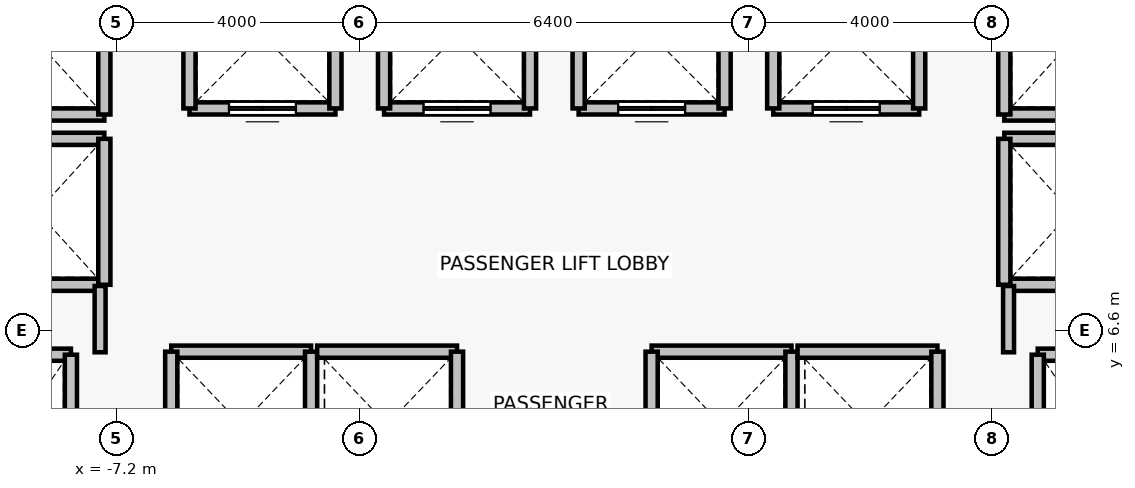
"""IFC4 building model, lengths in metres.
Left out: names, types, materials, properties, quantities, classifications, styles, units other than length and angle.
Written with IfcOpenShell. Run it as: python <this file> out.ifc"""

import sys

from ifc_helpers import new_model, si_unit, direction, frame, frame_2d, origin, place, context, subcontext, project, spatial, rectangle, extrude, source, transform, mapped, element, fill, save


model = new_model("IFC4")
c1 = context("Model", 3, precision=1e-05, world=origin(), true_north=direction((0.0, 1.0)))
c2 = subcontext(c1, "Body", "Model", "MODEL_VIEW")
j1 = project(units=[si_unit("LENGTHUNIT", "METRE"), si_unit("PLANEANGLEUNIT", "RADIAN")], contexts=[c1])
p1 = place(None, origin())
s1 = spatial("IfcSite", under=j1, at=p1, CompositionType="ELEMENT")
p2 = place(p1, origin())
s2 = spatial("IfcBuilding", under=s1, at=p2, CompositionType="ELEMENT")
p3 = place(p2, frame((0.0, 0.0, 57.1)))
s3 = spatial("IfcBuildingStorey", under=s2, at=p3, CompositionType="ELEMENT", Elevation=57.1)
p4 = place(p3, frame((-9.95, 6.2, 0.0), z_axis=(0.0, 0.0, 1.0), x_axis=(1.0, 0.0, 0.0)))
e1 = element("IfcWall", 1, at=p4, inside=s3, PredefinedType="SOLIDWALL", context=c2, shape_type="SweptSolid", body=[
    extrude(rectangle(XDim=2.0, YDim=0.2, at=frame_2d((1.0, 0.0))), origin(), (0.0, 0.0, 1.0), 3.075),
])
p5 = place(p3, frame((-7.95, 6.2, 0.0), z_axis=(0.0, 0.0, 1.0), x_axis=(0.0, -1.0, 0.0)))
e2 = element("IfcWall", 2, at=p5, inside=s3, PredefinedType="SOLIDWALL", context=c2, shape_type="SweptSolid", body=[
    extrude(rectangle(XDim=2.8, YDim=0.2, at=frame_2d((1.4, 0.0))), origin(), (0.0, 0.0, 1.0), 3.075),
])
p6 = place(p3, frame((7.95, 6.2, 0.0), z_axis=(0.0, 0.0, 1.0), x_axis=(1.0, 0.0, 0.0)))
e3 = element("IfcWall", 3, at=p6, inside=s3, PredefinedType="SOLIDWALL", context=c2, shape_type="SweptSolid", body=[
    extrude(rectangle(XDim=2.0, YDim=0.2, at=frame_2d((1.0, 0.0))), origin(), (0.0, 0.0, 1.0), 3.075),
])
p7 = place(p3, frame((7.95, 3.4, 0.0), z_axis=(0.0, 0.0, 1.0), x_axis=(0.0, 1.0, 0.0)))
e4 = element("IfcWall", 4, at=p7, inside=s3, PredefinedType="SOLIDWALL", context=c2, shape_type="SweptSolid", body=[
    extrude(rectangle(XDim=2.8, YDim=0.2, at=frame_2d((1.4, 0.0))), origin(), (0.0, 0.0, 1.0), 3.075),
])
p8 = place(p3, frame((-3.6, 10.25, 0.0), z_axis=(0.0, 0.0, 1.0), x_axis=(-1.0, 0.0, 0.0)))
e5 = element("IfcWall", 5, at=p8, inside=s3, PredefinedType="SOLIDWALL", context=c2, shape_type="SweptSolid", body=[
    extrude(rectangle(XDim=2.4, YDim=0.2, at=frame_2d((1.2, 0.0))), origin(), (0.0, 0.0, 1.0), 3.075),
])
p9 = place(p8, frame((0.65, 0.0, 0.0)))
e6 = element("IfcOpeningElement", 6, at=p9, cuts=e5, PredefinedType="OPENING", context=c2, shape_type="SweptSolid", body=[
    extrude(rectangle(XDim=1.1, YDim=2.2, at=frame_2d((0.55, 1.1))), frame((0.0, 0.11, 0.0), z_axis=(0.0, -1.0, 0.0), x_axis=(1.0, 0.0, 0.0)), (0.0, 0.0, 1.0), 0.22),
])
for number, where, z_axis, x_axis in (
    (7, (-6.0, 10.25, 0.0), (0.0, 0.0, 1.0), (0.0, 1.0, 0.0)),
    (8, (-3.6, 12.65, 0.0), (0.0, 0.0, 1.0), (0.0, -1.0, 0.0)),
):
    element("IfcWall", number, at=place(p3, frame(where, z_axis=z_axis, x_axis=x_axis)), inside=s3, PredefinedType="SOLIDWALL", context=c2, shape_type="SweptSolid", body=[
        extrude(rectangle(XDim=2.4, YDim=0.2, at=frame_2d((1.2, 0.0))), origin(), (0.0, 0.0, 1.0), 3.075),
    ])
p10 = place(p3, frame((-0.4, 10.25, 0.0), z_axis=(0.0, 0.0, 1.0), x_axis=(-1.0, 0.0, 0.0)))
e9 = element("IfcWall", 9, at=p10, inside=s3, PredefinedType="SOLIDWALL", context=c2, shape_type="SweptSolid", body=[
    extrude(rectangle(XDim=2.4, YDim=0.2, at=frame_2d((1.2, 0.0))), origin(), (0.0, 0.0, 1.0), 3.075),
])
p11 = place(p10, frame((0.65, 0.0, 0.0)))
e10 = element("IfcOpeningElement", 10, at=p11, cuts=e9, PredefinedType="OPENING", context=c2, shape_type="SweptSolid", body=[
    extrude(rectangle(XDim=1.1, YDim=2.2, at=frame_2d((0.55, 1.1))), frame((0.0, 0.11, 0.0), z_axis=(0.0, -1.0, 0.0), x_axis=(1.0, 0.0, 0.0)), (0.0, 0.0, 1.0), 0.22),
])
for number, where, z_axis, x_axis in (
    (11, (-2.8, 10.25, 0.0), (0.0, 0.0, 1.0), (0.0, 1.0, 0.0)),
    (12, (-0.4, 12.65, 0.0), (0.0, 0.0, 1.0), (0.0, -1.0, 0.0)),
):
    element("IfcWall", number, at=place(p3, frame(where, z_axis=z_axis, x_axis=x_axis)), inside=s3, PredefinedType="SOLIDWALL", context=c2, shape_type="SweptSolid", body=[
        extrude(rectangle(XDim=2.4, YDim=0.2, at=frame_2d((1.2, 0.0))), origin(), (0.0, 0.0, 1.0), 3.075),
    ])
p12 = place(p3, frame((2.8, 10.25, 0.0), z_axis=(0.0, 0.0, 1.0), x_axis=(-1.0, 0.0, 0.0)))
e13 = element("IfcWall", 13, at=p12, inside=s3, PredefinedType="SOLIDWALL", context=c2, shape_type="SweptSolid", body=[
    extrude(rectangle(XDim=2.4, YDim=0.2, at=frame_2d((1.2, 0.0))), origin(), (0.0, 0.0, 1.0), 3.075),
])
p13 = place(p12, frame((0.65, 0.0, 0.0)))
e14 = element("IfcOpeningElement", 14, at=p13, cuts=e13, PredefinedType="OPENING", context=c2, shape_type="SweptSolid", body=[
    extrude(rectangle(XDim=1.1, YDim=2.2, at=frame_2d((0.55, 1.1))), frame((0.0, 0.11, 0.0), z_axis=(0.0, -1.0, 0.0), x_axis=(1.0, 0.0, 0.0)), (0.0, 0.0, 1.0), 0.22),
])
for number, where, z_axis, x_axis in (
    (15, (0.4, 10.25, 0.0), (0.0, 0.0, 1.0), (0.0, 1.0, 0.0)),
    (16, (2.8, 12.65, 0.0), (0.0, 0.0, 1.0), (0.0, -1.0, 0.0)),
):
    element("IfcWall", number, at=place(p3, frame(where, z_axis=z_axis, x_axis=x_axis)), inside=s3, PredefinedType="SOLIDWALL", context=c2, shape_type="SweptSolid", body=[
        extrude(rectangle(XDim=2.4, YDim=0.2, at=frame_2d((1.2, 0.0))), origin(), (0.0, 0.0, 1.0), 3.075),
    ])
p14 = place(p3, frame((6.0, 10.25, 0.0), z_axis=(0.0, 0.0, 1.0), x_axis=(-1.0, 0.0, 0.0)))
e17 = element("IfcWall", 17, at=p14, inside=s3, PredefinedType="SOLIDWALL", context=c2, shape_type="SweptSolid", body=[
    extrude(rectangle(XDim=2.4, YDim=0.2, at=frame_2d((1.2, 0.0))), origin(), (0.0, 0.0, 1.0), 3.075),
])
p15 = place(p14, frame((0.65, 0.0, 0.0)))
e18 = element("IfcOpeningElement", 18, at=p15, cuts=e17, PredefinedType="OPENING", context=c2, shape_type="SweptSolid", body=[
    extrude(rectangle(XDim=1.1, YDim=2.2, at=frame_2d((0.55, 1.1))), frame((0.0, 0.11, 0.0), z_axis=(0.0, -1.0, 0.0), x_axis=(1.0, 0.0, 0.0)), (0.0, 0.0, 1.0), 0.22),
])
for number, where, z_axis, x_axis in (
    (19, (3.6, 10.25, 0.0), (0.0, 0.0, 1.0), (0.0, 1.0, 0.0)),
    (20, (6.0, 12.65, 0.0), (0.0, 0.0, 1.0), (0.0, -1.0, 0.0)),
):
    element("IfcWall", number, at=place(p3, frame(where, z_axis=z_axis, x_axis=x_axis)), inside=s3, PredefinedType="SOLIDWALL", context=c2, shape_type="SweptSolid", body=[
        extrude(rectangle(XDim=2.4, YDim=0.2, at=frame_2d((1.2, 0.0))), origin(), (0.0, 0.0, 1.0), 3.075),
    ])
p16 = place(p3, frame((-6.3, 6.25, 0.0), z_axis=(0.0, 0.0, 1.0), x_axis=(1.0, 0.0, 0.0)))
e21 = element("IfcWall", 21, at=p16, inside=s3, PredefinedType="SOLIDWALL", context=c2, shape_type="SweptSolid", body=[
    extrude(rectangle(XDim=2.3, YDim=0.2, at=frame_2d((1.15, 0.0))), origin(), (0.0, 0.0, 1.0), 3.075),
])
for number, where, z_axis, x_axis in (
    (22, (-6.3, 3.85, 0.0), (0.0, 0.0, 1.0), (0.0, 1.0, 0.0)),
    (23, (-4.0, 6.25, 0.0), (0.0, 0.0, 1.0), (0.0, -1.0, 0.0)),
):
    element("IfcWall", number, at=place(p3, frame(where, z_axis=z_axis, x_axis=x_axis)), inside=s3, PredefinedType="SOLIDWALL", context=c2, shape_type="SweptSolid", body=[
        extrude(rectangle(XDim=2.4, YDim=0.2, at=frame_2d((1.2, 0.0))), origin(), (0.0, 0.0, 1.0), 3.075),
    ])
p17 = place(p3, frame((-3.9, 6.25, 0.0), z_axis=(0.0, 0.0, 1.0), x_axis=(1.0, 0.0, 0.0)))
e24 = element("IfcWall", 24, at=p17, inside=s3, PredefinedType="SOLIDWALL", context=c2, shape_type="SweptSolid", body=[
    extrude(rectangle(XDim=2.3, YDim=0.2, at=frame_2d((1.15, 0.0))), origin(), (0.0, 0.0, 1.0), 3.075),
])
p18 = place(p3, frame((-1.6, 6.25, 0.0), z_axis=(0.0, 0.0, 1.0), x_axis=(0.0, -1.0, 0.0)))
e25 = element("IfcWall", 25, at=p18, inside=s3, PredefinedType="SOLIDWALL", context=c2, shape_type="SweptSolid", body=[
    extrude(rectangle(XDim=2.4, YDim=0.2, at=frame_2d((1.2, 0.0))), origin(), (0.0, 0.0, 1.0), 3.075),
])
p19 = place(p3, frame((1.6, 6.25, 0.0), z_axis=(0.0, 0.0, 1.0), x_axis=(1.0, 0.0, 0.0)))
e26 = element("IfcWall", 26, at=p19, inside=s3, PredefinedType="SOLIDWALL", context=c2, shape_type="SweptSolid", body=[
    extrude(rectangle(XDim=2.3, YDim=0.2, at=frame_2d((1.15, 0.0))), origin(), (0.0, 0.0, 1.0), 3.075),
])
for number, where, z_axis, x_axis in (
    (27, (1.6, 3.85, 0.0), (0.0, 0.0, 1.0), (0.0, 1.0, 0.0)),
    (28, (3.9, 6.25, 0.0), (0.0, 0.0, 1.0), (0.0, -1.0, 0.0)),
):
    element("IfcWall", number, at=place(p3, frame(where, z_axis=z_axis, x_axis=x_axis)), inside=s3, PredefinedType="SOLIDWALL", context=c2, shape_type="SweptSolid", body=[
        extrude(rectangle(XDim=2.4, YDim=0.2, at=frame_2d((1.2, 0.0))), origin(), (0.0, 0.0, 1.0), 3.075),
    ])
p20 = place(p3, frame((4.0, 6.25, 0.0), z_axis=(0.0, 0.0, 1.0), x_axis=(1.0, 0.0, 0.0)))
e29 = element("IfcWall", 29, at=p20, inside=s3, PredefinedType="SOLIDWALL", context=c2, shape_type="SweptSolid", body=[
    extrude(rectangle(XDim=2.3, YDim=0.2, at=frame_2d((1.15, 0.0))), origin(), (0.0, 0.0, 1.0), 3.075),
])
p21 = place(p3, frame((6.3, 6.25, 0.0), z_axis=(0.0, 0.0, 1.0), x_axis=(0.0, -1.0, 0.0)))
e30 = element("IfcWall", 30, at=p21, inside=s3, PredefinedType="SOLIDWALL", context=c2, shape_type="SweptSolid", body=[
    extrude(rectangle(XDim=2.4, YDim=0.2, at=frame_2d((1.2, 0.0))), origin(), (0.0, 0.0, 1.0), 3.075),
])
for number, where, z_axis, x_axis in (
    (31, (-7.4, 7.35, 0.0), (0.0, 0.0, 1.0), (-1.0, 0.0, 0.0)),
    (32, (-9.6, 9.75, 0.0), (0.0, 0.0, 1.0), (1.0, 0.0, 0.0)),
):
    element("IfcWall", number, at=place(p3, frame(where, z_axis=z_axis, x_axis=x_axis)), inside=s3, PredefinedType="SOLIDWALL", context=c2, shape_type="SweptSolid", body=[
        extrude(rectangle(XDim=2.2, YDim=0.2, at=frame_2d((1.1, 0.0))), origin(), (0.0, 0.0, 1.0), 2.465),
    ])
p22 = place(p3, frame((-7.4, 9.75, 0.0), z_axis=(0.0, 0.0, 1.0), x_axis=(0.0, -1.0, 0.0)))
e33 = element("IfcWall", 33, at=p22, inside=s3, PredefinedType="SOLIDWALL", context=c2, shape_type="SweptSolid", body=[
    extrude(rectangle(XDim=2.4, YDim=0.2, at=frame_2d((1.2, 0.0))), origin(), (0.0, 0.0, 1.0), 2.465),
])
p23 = place(p3, frame((-7.4, 10.15, 0.0), z_axis=(0.0, 0.0, 1.0), x_axis=(-1.0, 0.0, 0.0)))
e34 = element("IfcWall", 34, at=p23, inside=s3, PredefinedType="SOLIDWALL", context=c2, shape_type="SweptSolid", body=[
    extrude(rectangle(XDim=2.2, YDim=0.2, at=frame_2d((1.1, 0.0))), origin(), (0.0, 0.0, 1.0), 2.465),
])
p24 = place(p3, frame((-7.4, 12.55, 0.0), z_axis=(0.0, 0.0, 1.0), x_axis=(0.0, -1.0, 0.0)))
e35 = element("IfcWall", 35, at=p24, inside=s3, PredefinedType="SOLIDWALL", context=c2, shape_type="SweptSolid", body=[
    extrude(rectangle(XDim=2.4, YDim=0.2, at=frame_2d((1.2, 0.0))), origin(), (0.0, 0.0, 1.0), 2.465),
])
for number, where, z_axis, x_axis in (
    (36, (9.6, 7.35, 0.0), (0.0, 0.0, 1.0), (-1.0, 0.0, 0.0)),
    (37, (7.4, 9.75, 0.0), (0.0, 0.0, 1.0), (1.0, 0.0, 0.0)),
):
    element("IfcWall", number, at=place(p3, frame(where, z_axis=z_axis, x_axis=x_axis)), inside=s3, PredefinedType="SOLIDWALL", context=c2, shape_type="SweptSolid", body=[
        extrude(rectangle(XDim=2.2, YDim=0.2, at=frame_2d((1.1, 0.0))), origin(), (0.0, 0.0, 1.0), 2.465),
    ])
p25 = place(p3, frame((7.4, 7.35, 0.0), z_axis=(0.0, 0.0, 1.0), x_axis=(0.0, 1.0, 0.0)))
e38 = element("IfcWall", 38, at=p25, inside=s3, PredefinedType="SOLIDWALL", context=c2, shape_type="SweptSolid", body=[
    extrude(rectangle(XDim=2.4, YDim=0.2, at=frame_2d((1.2, 0.0))), origin(), (0.0, 0.0, 1.0), 2.465),
])
p26 = place(p3, frame((9.6, 10.15, 0.0), z_axis=(0.0, 0.0, 1.0), x_axis=(-1.0, 0.0, 0.0)))
e39 = element("IfcWall", 39, at=p26, inside=s3, PredefinedType="SOLIDWALL", context=c2, shape_type="SweptSolid", body=[
    extrude(rectangle(XDim=2.2, YDim=0.2, at=frame_2d((1.1, 0.0))), origin(), (0.0, 0.0, 1.0), 2.465),
])
p27 = place(p3, frame((7.4, 10.15, 0.0), z_axis=(0.0, 0.0, 1.0), x_axis=(0.0, 1.0, 0.0)))
e40 = element("IfcWall", 40, at=p27, inside=s3, PredefinedType="SOLIDWALL", context=c2, shape_type="SweptSolid", body=[
    extrude(rectangle(XDim=2.4, YDim=0.2, at=frame_2d((1.2, 0.0))), origin(), (0.0, 0.0, 1.0), 2.465),
])
for number, where, z_axis, x_axis in (
    (41, (-7.47, 7.33, 0.0), (0.0, 0.0, 1.0), (0.0, -1.0, 0.0)),
    (42, (7.47, 6.24, 0.0), (0.0, 0.0, 1.0), (0.0, 1.0, 0.0)),
):
    element("IfcWall", number, at=place(p3, frame(where, z_axis=z_axis, x_axis=x_axis)), inside=s3, PredefinedType="PARTITIONING", context=c2, shape_type="SweptSolid", body=[
        extrude(rectangle(XDim=1.09, YDim=0.18, at=frame_2d((0.545, 0.0))), origin(), (0.0, 0.0, 1.0), 2.465),
    ])
m1 = source(origin(), c2, "Body", "SweptSolid", [
    extrude(rectangle(XDim=1.1, YDim=2.2, at=frame_2d((0.55, 1.1))), frame((0.0, 0.025, 0.0), z_axis=(0.0, -1.0, 0.0), x_axis=(1.0, 0.0, 0.0)), (0.0, 0.0, 1.0), 0.05),
])
p28 = place(p9, origin())
e43 = element("IfcDoor", 43, at=p28, inside=s3, OperationType="DOUBLE_DOOR_SLIDING", PredefinedType="DOOR", context=c2, shape_type="MappedRepresentation", body=[
    mapped(m1, transform((0.0, 0.0, 0.0), x_axis=(1.0, 0.0, 0.0), y_axis=(0.0, 1.0, 0.0), z_axis=(0.0, 0.0, 1.0), scale=1.0)),
])
fill(e6, e43)
p29 = place(p11, origin())
e44 = element("IfcDoor", 44, at=p29, inside=s3, OperationType="DOUBLE_DOOR_SLIDING", PredefinedType="DOOR", context=c2, shape_type="MappedRepresentation", body=[
    mapped(m1, transform((0.0, 0.0, 0.0), x_axis=(1.0, 0.0, 0.0), y_axis=(0.0, 1.0, 0.0), z_axis=(0.0, 0.0, 1.0), scale=1.0)),
])
fill(e10, e44)
p30 = place(p13, origin())
e45 = element("IfcDoor", 45, at=p30, inside=s3, OperationType="DOUBLE_DOOR_SLIDING", PredefinedType="DOOR", context=c2, shape_type="MappedRepresentation", body=[
    mapped(m1, transform((0.0, 0.0, 0.0), x_axis=(1.0, 0.0, 0.0), y_axis=(0.0, 1.0, 0.0), z_axis=(0.0, 0.0, 1.0), scale=1.0)),
])
fill(e14, e45)
p31 = place(p15, origin())
e46 = element("IfcDoor", 46, at=p31, inside=s3, OperationType="DOUBLE_DOOR_SLIDING", PredefinedType="DOOR", context=c2, shape_type="MappedRepresentation", body=[
    mapped(m1, transform((0.0, 0.0, 0.0), x_axis=(1.0, 0.0, 0.0), y_axis=(0.0, 1.0, 0.0), z_axis=(0.0, 0.0, 1.0), scale=1.0)),
])
fill(e18, e46)
save(model, sys.argv[1])
